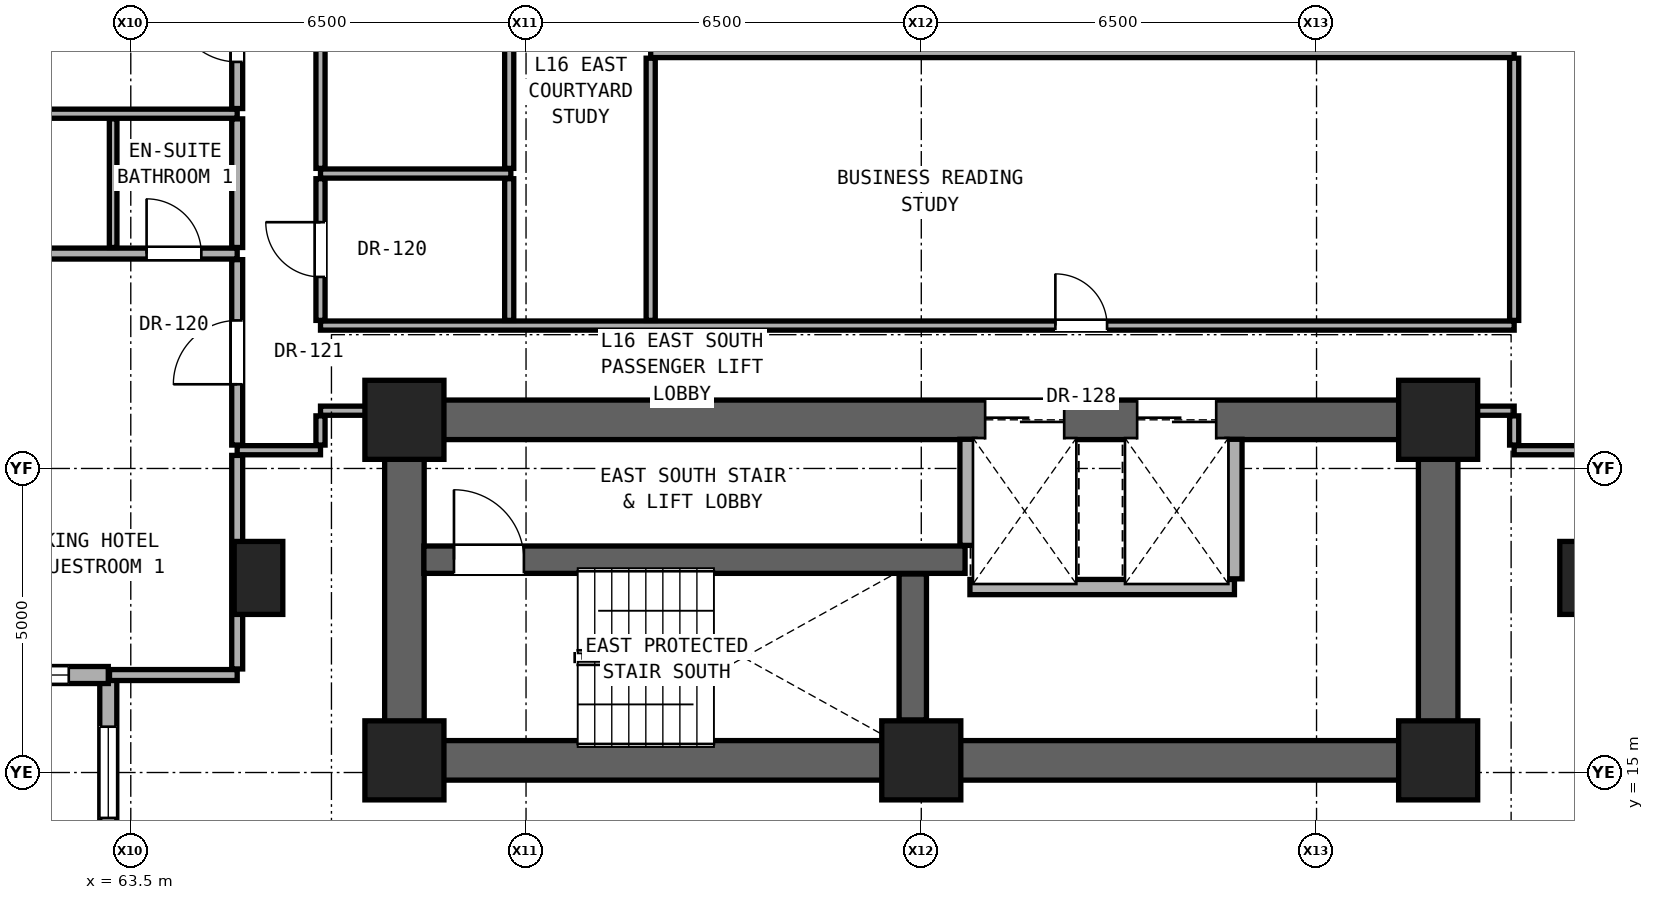
"""IFC4 building model, lengths in metres.
Left out: names, types, materials, properties, quantities, classifications, styles, units other than length and angle.
Written with IfcOpenShell. Run it as: python <this file> out.ifc"""

import sys

from ifc_helpers import new_model, si_unit, direction, frame, frame_2d, origin, origin_2d, place, context, subcontext, project, spatial, rectangle, extrude, element, fill, save


model = new_model("IFC4")
c1 = context("Model", 3, precision=1e-05, world=origin(), true_north=direction((0.0, 1.0)))
c2 = subcontext(c1, "Body", "Model", "MODEL_VIEW")
j1 = project(units=[si_unit("LENGTHUNIT", "METRE"), si_unit("PLANEANGLEUNIT", "RADIAN")], contexts=[c1])
p1 = place(None, origin())
s1 = spatial("IfcSite", under=j1, at=p1, CompositionType="ELEMENT")
p2 = place(p1, origin())
s2 = spatial("IfcBuilding", under=s1, at=p2, CompositionType="ELEMENT")
p3 = place(p2, frame((0.0, 0.0, 58.7)))
s3 = spatial("IfcBuildingStorey", under=s2, at=p3, CompositionType="ELEMENT", Elevation=58.7)
for number, where, z_axis, x_axis in (
    (1, (68.0, 15.2, 0.0), (0.0, 0.0, 1.0), (1.0, 0.0, 0.0)),
    (2, (76.5, 15.2, 0.0), (0.0, 0.0, 1.0), (1.0, 0.0, 0.0)),
    (3, (85.0, 15.2, 0.0), (0.0, 0.0, 1.0), (1.0, 0.0, 0.0)),
    (4, (68.0, 20.8, 0.0), (0.0, 0.0, 1.0), (1.0, 0.0, 0.0)),
    (5, (85.0, 20.8, 0.0), (0.0, 0.0, 1.0), (1.0, 0.0, 0.0)),
):
    element("IfcColumn", number, at=place(p3, frame(where, z_axis=z_axis, x_axis=x_axis)), inside=s3, PredefinedType="COLUMN", context=c2, shape_type="SweptSolid", body=[
        extrude(rectangle(XDim=1.3, YDim=1.3, at=origin_2d()), origin(), (0.0, 0.0, 1.0), 3.3),
    ])
for number, where, z_axis, x_axis in (
    (6, (65.6, 18.2, 0.0), (0.0, 0.0, 1.0), (1.0, 0.0, 0.0)),
    (7, (87.4, 18.2, 0.0), (0.0, 0.0, 1.0), (1.0, 0.0, 0.0)),
):
    element("IfcColumn", number, at=place(p3, frame(where, z_axis=z_axis, x_axis=x_axis)), inside=s3, PredefinedType="PILASTER", context=c2, shape_type="SweptSolid", body=[
        extrude(rectangle(XDim=0.8, YDim=1.2, at=origin_2d()), origin(), (0.0, 0.0, 1.0), 3.3),
    ])
p4 = place(p3, frame((68.0, 15.2, 0.0), z_axis=(0.0, 0.0, 1.0), x_axis=(1.0, 0.0, 0.0)))
e8 = element("IfcWall", 8, at=p4, inside=s3, PredefinedType="SHEAR", context=c2, shape_type="SweptSolid", body=[
    extrude(rectangle(XDim=17.0, YDim=0.65, at=frame_2d((8.5, 0.0))), origin(), (0.0, 0.0, 1.0), 3.06),
])
for number, where, z_axis, x_axis in (
    (9, (68.0, 15.2, 0.0), (0.0, 0.0, 1.0), (0.0, 1.0, 0.0)),
    (10, (85.0, 15.2, 0.0), (0.0, 0.0, 1.0), (0.0, 1.0, 0.0)),
):
    element("IfcWall", number, at=place(p3, frame(where, z_axis=z_axis, x_axis=x_axis)), inside=s3, PredefinedType="SHEAR", context=c2, shape_type="SweptSolid", body=[
        extrude(rectangle(XDim=5.6, YDim=0.65, at=frame_2d((2.8, 0.0))), origin(), (0.0, 0.0, 1.0), 3.06),
    ])
p5 = place(p3, frame((68.0, 20.8, 0.0), z_axis=(0.0, 0.0, 1.0), x_axis=(1.0, 0.0, 0.0)))
e11 = element("IfcWall", 11, at=p5, inside=s3, PredefinedType="SHEAR", context=c2, shape_type="SweptSolid", body=[
    extrude(rectangle(XDim=17.0, YDim=0.65, at=frame_2d((8.5, 0.0))), origin(), (0.0, 0.0, 1.0), 3.06),
])
p6 = place(p5, frame((9.55, 0.0, 0.0)))
e12 = element("IfcOpeningElement", 12, at=p6, cuts=e11, PredefinedType="OPENING", context=c2, shape_type="SweptSolid", body=[
    extrude(rectangle(XDim=1.3, YDim=2.3, at=frame_2d((0.65, 1.15))), frame((0.0, 0.335, 0.0), z_axis=(0.0, -1.0, 0.0), x_axis=(1.0, 0.0, 0.0)), (0.0, 0.0, 1.0), 0.67),
])
p7 = place(p5, frame((12.05, 0.0, 0.0)))
e13 = element("IfcOpeningElement", 13, at=p7, cuts=e11, PredefinedType="OPENING", context=c2, shape_type="SweptSolid", body=[
    extrude(rectangle(XDim=1.3, YDim=2.3, at=frame_2d((0.65, 1.15))), frame((0.0, 0.335, 0.0), z_axis=(0.0, -1.0, 0.0), x_axis=(1.0, 0.0, 0.0)), (0.0, 0.0, 1.0), 0.67),
])
p8 = place(p3, frame((63.13, 16.604, 0.0), z_axis=(0.0, 0.0, 1.0), x_axis=(0.0, -1.0, 0.0)))
e14 = element("IfcWall", 14, at=p8, inside=s3, PredefinedType="SOLIDWALL", context=c2, shape_type="SweptSolid", body=[
    extrude(rectangle(XDim=4.546, YDim=0.28, at=frame_2d((2.273, 0.0))), origin(), (0.0, 0.0, 1.0), 3.04),
])
p9 = place(p8, frame((0.85, 0.0, 0.79)))
e15 = element("IfcOpeningElement", 15, at=p9, cuts=e14, PredefinedType="OPENING", context=c2, shape_type="SweptSolid", body=[
    extrude(rectangle(XDim=1.5, YDim=2.1, at=frame_2d((0.75, 1.05))), frame((0.0, 0.15, 0.0), z_axis=(0.0, -1.0, 0.0), x_axis=(1.0, 0.0, 0.0)), (0.0, 0.0, 1.0), 0.3),
])
p10 = place(p3, frame((58.584, 16.604, 0.0), z_axis=(0.0, 0.0, 1.0), x_axis=(1.0, 0.0, 0.0)))
e16 = element("IfcWall", 16, at=p10, inside=s3, PredefinedType="SOLIDWALL", context=c2, shape_type="SweptSolid", body=[
    extrude(rectangle(XDim=4.546, YDim=0.28, at=frame_2d((2.273, 0.0))), origin(), (0.0, 0.0, 1.0), 3.04),
])
p11 = place(p10, frame((2.796, 0.0, 0.85)))
e17 = element("IfcOpeningElement", 17, at=p11, cuts=e16, PredefinedType="OPENING", context=c2, shape_type="SweptSolid", body=[
    extrude(rectangle(XDim=1.1, YDim=2.0, at=frame_2d((0.55, 1.0))), frame((0.0, 0.15, 0.0), z_axis=(0.0, -1.0, 0.0), x_axis=(1.0, 0.0, 0.0)), (0.0, 0.0, 1.0), 0.3),
])
p12 = place(p3, frame((63.15, 16.603, 0.0), z_axis=(0.0, 0.0, 1.0), x_axis=(1.0, 0.0, 0.0)))
e18 = element("IfcWall", 18, at=p12, inside=s3, PredefinedType="PARTITIONING", context=c2, shape_type="SweptSolid", body=[
    extrude(rectangle(XDim=2.1, YDim=0.18, at=frame_2d((1.05, 0.0))), origin(), (0.0, 0.0, 1.0), 3.06),
])
p13 = place(p3, frame((77.3, 18.05, 0.0), z_axis=(0.0, 0.0, 1.0), x_axis=(1.0, 0.0, 0.0)))
e19 = element("IfcWall", 19, at=p13, inside=s3, PredefinedType="SOLIDWALL", context=c2, shape_type="SweptSolid", body=[
    extrude(rectangle(XDim=4.35, YDim=0.25, at=frame_2d((2.175, 0.0))), origin(), (0.0, 0.0, 1.0), 3.06),
])
p14 = place(p3, frame((68.32, 18.5, 0.0), z_axis=(0.0, 0.0, 1.0), x_axis=(1.0, 0.0, 0.0)))
e20 = element("IfcWall", 20, at=p14, inside=s3, PredefinedType="SHEAR", context=c2, shape_type="SweptSolid", body=[
    extrude(rectangle(XDim=8.9, YDim=0.45, at=frame_2d((4.45, 0.0))), origin(), (0.0, 0.0, 1.0), 3.06),
])
p15 = place(p14, frame((0.495, 0.0, 0.0)))
e21 = element("IfcOpeningElement", 21, at=p15, cuts=e20, PredefinedType="OPENING", context=c2, shape_type="SweptSolid", body=[
    extrude(rectangle(XDim=1.15, YDim=2.2, at=frame_2d((0.575, 1.1))), frame((0.0, 0.235, 0.0), z_axis=(0.0, -1.0, 0.0), x_axis=(1.0, 0.0, 0.0)), (0.0, 0.0, 1.0), 0.47),
])
p16 = place(p3, frame((65.25, 20.3, 0.0), z_axis=(0.0, 0.0, 1.0), x_axis=(1.0, 0.0, 0.0)))
e22 = element("IfcWall", 22, at=p16, inside=s3, PredefinedType="PARTITIONING", context=c2, shape_type="SweptSolid", body=[
    extrude(rectangle(XDim=1.37, YDim=0.15, at=frame_2d((0.685, 0.0))), origin(), (0.0, 0.0, 1.0), 3.06),
])
p17 = place(p3, frame((86.25, 20.3, 0.0), z_axis=(0.0, 0.0, 1.0), x_axis=(1.0, 0.0, 0.0)))
e23 = element("IfcWall", 23, at=p17, inside=s3, PredefinedType="PARTITIONING", context=c2, shape_type="SweptSolid", body=[
    extrude(rectangle(XDim=1.35, YDim=0.15, at=frame_2d((0.675, 0.0))), origin(), (0.0, 0.0, 1.0), 3.06),
])
p18 = place(p3, frame((66.62, 20.95, 0.0), z_axis=(0.0, 0.0, 1.0), x_axis=(1.0, 0.0, 0.0)))
e24 = element("IfcWall", 24, at=p18, inside=s3, PredefinedType="PARTITIONING", context=c2, shape_type="SweptSolid", body=[
    extrude(rectangle(XDim=1.06, YDim=0.15, at=frame_2d((0.53, 0.0))), origin(), (0.0, 0.0, 1.0), 2.452),
])
p19 = place(p3, frame((85.32, 20.95, 0.0), z_axis=(0.0, 0.0, 1.0), x_axis=(1.0, 0.0, 0.0)))
e25 = element("IfcWall", 25, at=p19, inside=s3, PredefinedType="PARTITIONING", context=c2, shape_type="SweptSolid", body=[
    extrude(rectangle(XDim=0.93, YDim=0.15, at=frame_2d((0.465, 0.0))), origin(), (0.0, 0.0, 1.0), 2.452),
])
p20 = place(p3, frame((66.62, 22.35, 0.0), z_axis=(0.0, 0.0, 1.0), x_axis=(1.0, 0.0, 0.0)))
e26 = element("IfcWall", 26, at=p20, inside=s3, PredefinedType="PARTITIONING", context=c2, shape_type="SweptSolid", body=[
    extrude(rectangle(XDim=19.63, YDim=0.15, at=frame_2d((9.815, 0.0))), origin(), (0.0, 0.0, 1.0), 2.125),
])
p21 = place(p20, frame((12.085, 0.0, 0.0)))
e27 = element("IfcOpeningElement", 27, at=p21, cuts=e26, PredefinedType="OPENING", context=c2, shape_type="SweptSolid", body=[
    extrude(rectangle(XDim=0.85, YDim=2.01, at=frame_2d((0.425, 1.005))), frame((0.0, 0.085, 0.0), z_axis=(0.0, -1.0, 0.0), x_axis=(1.0, 0.0, 0.0)), (0.0, 0.0, 1.0), 0.17),
])
p22 = place(p3, frame((58.584, 23.534, 0.0), z_axis=(0.0, 0.0, 1.0), x_axis=(1.0, 0.0, 0.0)))
e28 = element("IfcWall", 28, at=p22, inside=s3, PredefinedType="PARTITIONING", context=c2, shape_type="SweptSolid", body=[
    extrude(rectangle(XDim=6.666, YDim=0.18, at=frame_2d((3.333, 0.0))), origin(), (0.0, 0.0, 1.0), 2.196),
])
p23 = place(p22, frame((1.858, 0.0, 0.0)))
e29 = element("IfcOpeningElement", 29, at=p23, cuts=e28, PredefinedType="OPENING", context=c2, shape_type="SweptSolid", body=[
    extrude(rectangle(XDim=0.95, YDim=2.15, at=frame_2d((0.475, 1.075))), frame((0.0, 0.1, 0.0), z_axis=(0.0, -1.0, 0.0), x_axis=(1.0, 0.0, 0.0)), (0.0, 0.0, 1.0), 0.2),
])
p24 = place(p22, frame((5.176, 0.0, 0.0)))
e30 = element("IfcOpeningElement", 30, at=p24, cuts=e28, PredefinedType="OPENING", context=c2, shape_type="SweptSolid", body=[
    extrude(rectangle(XDim=0.9, YDim=2.1, at=frame_2d((0.45, 1.05))), frame((0.0, 0.1, 0.0), z_axis=(0.0, -1.0, 0.0), x_axis=(1.0, 0.0, 0.0)), (0.0, 0.0, 1.0), 0.2),
])
p25 = place(p3, frame((66.62, 24.85, 0.0), z_axis=(0.0, 0.0, 1.0), x_axis=(1.0, 0.0, 0.0)))
e31 = element("IfcWall", 31, at=p25, inside=s3, PredefinedType="PARTITIONING", context=c2, shape_type="SweptSolid", body=[
    extrude(rectangle(XDim=3.13, YDim=0.15, at=frame_2d((1.565, 0.0))), origin(), (0.0, 0.0, 1.0), 2.125),
])
p26 = place(p3, frame((58.584, 25.834, 0.0), z_axis=(0.0, 0.0, 1.0), x_axis=(1.0, 0.0, 0.0)))
e32 = element("IfcWall", 32, at=p26, inside=s3, PredefinedType="PARTITIONING", context=c2, shape_type="SweptSolid", body=[
    extrude(rectangle(XDim=6.666, YDim=0.15, at=frame_2d((3.333, 0.0))), origin(), (0.0, 0.0, 1.0), 2.196),
])
p27 = place(p3, frame((72.05, 26.832, 0.0), z_axis=(0.0, 0.0, 1.0), x_axis=(1.0, 0.0, 0.0)))
e33 = element("IfcWall", 33, at=p27, inside=s3, PredefinedType="PARTITIONING", context=c2, shape_type="SweptSolid", body=[
    extrude(rectangle(XDim=14.2, YDim=0.15, at=frame_2d((7.1, 0.0))), origin(), (0.0, 0.0, 1.0), 2.125),
])
p28 = place(p3, frame((63.21, 23.634, 0.0), z_axis=(0.0, 0.0, 1.0), x_axis=(0.0, 1.0, 0.0)))
e34 = element("IfcWall", 34, at=p28, inside=s3, PredefinedType="PARTITIONING", context=c2, shape_type="SweptSolid", body=[
    extrude(rectangle(XDim=2.115, YDim=0.125, at=frame_2d((1.058, 0.0))), origin(), (0.0, 0.0, 1.0), 3.06),
])
p29 = place(p3, frame((65.25, 16.703, 0.0), z_axis=(0.0, 0.0, 1.0), x_axis=(0.0, 1.0, 0.0)))
e35 = element("IfcWall", 35, at=p29, inside=s3, PredefinedType="PARTITIONING", context=c2, shape_type="SweptSolid", body=[
    extrude(rectangle(XDim=3.512, YDim=0.18, at=frame_2d((1.756, 0.0))), origin(), (0.0, 0.0, 1.0), 2.436),
])
p30 = place(p3, frame((65.25, 20.385, 0.0), z_axis=(0.0, 0.0, 1.0), x_axis=(0.0, 1.0, 0.0)))
e36 = element("IfcWall", 36, at=p30, inside=s3, PredefinedType="PARTITIONING", context=c2, shape_type="SweptSolid", body=[
    extrude(rectangle(XDim=3.049, YDim=0.18, at=frame_2d((1.524, 0.0))), origin(), (0.0, 0.0, 1.0), 2.452),
])
p31 = place(p30, frame((1.0, 0.0, 0.0)))
e37 = element("IfcOpeningElement", 37, at=p31, cuts=e36, PredefinedType="OPENING", context=c2, shape_type="SweptSolid", body=[
    extrude(rectangle(XDim=1.05, YDim=2.2, at=frame_2d((0.525, 1.1))), frame((0.0, 0.1, 0.0), z_axis=(0.0, -1.0, 0.0), x_axis=(1.0, 0.0, 0.0)), (0.0, 0.0, 1.0), 0.2),
])
p32 = place(p3, frame((65.25, 23.634, 0.0), z_axis=(0.0, 0.0, 1.0), x_axis=(0.0, 1.0, 0.0)))
e38 = element("IfcWall", 38, at=p32, inside=s3, PredefinedType="PARTITIONING", context=c2, shape_type="SweptSolid", body=[
    extrude(rectangle(XDim=2.115, YDim=0.18, at=frame_2d((1.058, 0.0))), origin(), (0.0, 0.0, 1.0), 3.06),
])
p33 = place(p3, frame((65.25, 25.919, 0.0), z_axis=(0.0, 0.0, 1.0), x_axis=(0.0, 1.0, 0.0)))
e39 = element("IfcWall", 39, at=p33, inside=s3, PredefinedType="PARTITIONING", context=c2, shape_type="SweptSolid", body=[
    extrude(rectangle(XDim=2.584, YDim=0.18, at=frame_2d((1.292, 0.0))), origin(), (0.0, 0.0, 1.0), 2.279),
])
p34 = place(p33, frame((0.767, 0.0, 0.0)))
e40 = element("IfcOpeningElement", 40, at=p34, cuts=e39, PredefinedType="OPENING", context=c2, shape_type="SweptSolid", body=[
    extrude(rectangle(XDim=1.05, YDim=2.2, at=frame_2d((0.525, 1.1))), frame((0.0, 0.1, 0.0), z_axis=(0.0, -1.0, 0.0), x_axis=(1.0, 0.0, 0.0)), (0.0, 0.0, 1.0), 0.2),
])
p35 = place(p3, frame((66.62, 20.385, 0.0), z_axis=(0.0, 0.0, 1.0), x_axis=(0.0, 1.0, 0.0)))
e41 = element("IfcWall", 41, at=p35, inside=s3, PredefinedType="PARTITIONING", context=c2, shape_type="SweptSolid", body=[
    extrude(rectangle(XDim=0.48, YDim=0.15, at=frame_2d((0.24, 0.0))), origin(), (0.0, 0.0, 1.0), 2.452),
])
p36 = place(p3, frame((66.62, 22.435, 0.0), z_axis=(0.0, 0.0, 1.0), x_axis=(0.0, 1.0, 0.0)))
e42 = element("IfcWall", 42, at=p36, inside=s3, PredefinedType="PARTITIONING", context=c2, shape_type="SweptSolid", body=[
    extrude(rectangle(XDim=2.33, YDim=0.15, at=frame_2d((1.165, 0.0))), origin(), (0.0, 0.0, 1.0), 3.06),
])
p37 = place(p36, frame((0.715, 0.0, 0.0)))
e43 = element("IfcOpeningElement", 43, at=p37, cuts=e42, PredefinedType="OPENING", context=c2, shape_type="SweptSolid", body=[
    extrude(rectangle(XDim=0.9, YDim=2.1, at=frame_2d((0.45, 1.05))), frame((0.0, 0.085, 0.0), z_axis=(0.0, -1.0, 0.0), x_axis=(1.0, 0.0, 0.0)), (0.0, 0.0, 1.0), 0.17),
])
p38 = place(p3, frame((66.62, 24.935, 0.0), z_axis=(0.0, 0.0, 1.0), x_axis=(0.0, 1.0, 0.0)))
e44 = element("IfcWall", 44, at=p38, inside=s3, PredefinedType="PARTITIONING", context=c2, shape_type="SweptSolid", body=[
    extrude(rectangle(XDim=5.63, YDim=0.15, at=frame_2d((2.815, 0.0))), origin(), (0.0, 0.0, 1.0), 2.279),
])
p39 = place(p38, frame((2.34, 0.0, 0.0)))
e45 = element("IfcOpeningElement", 45, at=p39, cuts=e44, PredefinedType="OPENING", context=c2, shape_type="SweptSolid", body=[
    extrude(rectangle(XDim=0.95, YDim=2.15, at=frame_2d((0.475, 1.075))), frame((0.0, 0.085, 0.0), z_axis=(0.0, -1.0, 0.0), x_axis=(1.0, 0.0, 0.0)), (0.0, 0.0, 1.0), 0.17),
])
p40 = place(p3, frame((69.723, 22.435, 0.0), z_axis=(0.0, 0.0, 1.0), x_axis=(0.0, 1.0, 0.0)))
e46 = element("IfcWall", 46, at=p40, inside=s3, PredefinedType="PARTITIONING", context=c2, shape_type="SweptSolid", body=[
    extrude(rectangle(XDim=2.33, YDim=0.15, at=frame_2d((1.165, 0.0))), origin(), (0.0, 0.0, 1.0), 3.06),
])
p41 = place(p3, frame((69.723, 24.935, 0.0), z_axis=(0.0, 0.0, 1.0), x_axis=(0.0, 1.0, 0.0)))
e47 = element("IfcWall", 47, at=p41, inside=s3, PredefinedType="PARTITIONING", context=c2, shape_type="SweptSolid", body=[
    extrude(rectangle(XDim=5.63, YDim=0.15, at=frame_2d((2.815, 0.0))), origin(), (0.0, 0.0, 1.0), 2.125),
])
p42 = place(p3, frame((72.05, 22.435, 0.0), z_axis=(0.0, 0.0, 1.0), x_axis=(0.0, 1.0, 0.0)))
e48 = element("IfcWall", 48, at=p42, inside=s3, PredefinedType="PARTITIONING", context=c2, shape_type="SweptSolid", body=[
    extrude(rectangle(XDim=4.312, YDim=0.15, at=frame_2d((2.156, 0.0))), origin(), (0.0, 0.0, 1.0), 2.589),
])
p43 = place(p3, frame((76.36, 15.865, 0.0), z_axis=(0.0, 0.0, 1.0), x_axis=(0.0, 1.0, 0.0)))
e49 = element("IfcWall", 49, at=p43, inside=s3, PredefinedType="SHEAR", context=c2, shape_type="SweptSolid", body=[
    extrude(rectangle(XDim=2.4, YDim=0.45, at=frame_2d((1.2, 0.0))), origin(), (0.0, 0.0, 1.0), 3.06),
])
p44 = place(p3, frame((77.26, 18.735, 0.0), z_axis=(0.0, 0.0, 1.0), x_axis=(0.0, 1.0, 0.0)))
e50 = element("IfcWall", 50, at=p44, inside=s3, PredefinedType="SOLIDWALL", context=c2, shape_type="SweptSolid", body=[
    extrude(rectangle(XDim=1.745, YDim=0.25, at=frame_2d((0.873, 0.0))), origin(), (0.0, 0.0, 1.0), 3.06),
])
p45 = place(p3, frame((81.65, 18.185, 0.0), z_axis=(0.0, 0.0, 1.0), x_axis=(0.0, 1.0, 0.0)))
e51 = element("IfcWall", 51, at=p45, inside=s3, PredefinedType="SOLIDWALL", context=c2, shape_type="SweptSolid", body=[
    extrude(rectangle(XDim=2.295, YDim=0.25, at=frame_2d((1.147, 0.0))), origin(), (0.0, 0.0, 1.0), 3.06),
])
p46 = place(p3, frame((86.25, 20.385, 0.0), z_axis=(0.0, 0.0, 1.0), x_axis=(0.0, 1.0, 0.0)))
e52 = element("IfcWall", 52, at=p46, inside=s3, PredefinedType="PARTITIONING", context=c2, shape_type="SweptSolid", body=[
    extrude(rectangle(XDim=0.48, YDim=0.15, at=frame_2d((0.24, 0.0))), origin(), (0.0, 0.0, 1.0), 2.452),
])
p47 = place(p3, frame((86.25, 22.435, 0.0), z_axis=(0.0, 0.0, 1.0), x_axis=(0.0, 1.0, 0.0)))
e53 = element("IfcWall", 53, at=p47, inside=s3, PredefinedType="PARTITIONING", context=c2, shape_type="SweptSolid", body=[
    extrude(rectangle(XDim=4.312, YDim=0.15, at=frame_2d((2.156, 0.0))), origin(), (0.0, 0.0, 1.0), 3.06),
])
p48 = place(p9, origin())
e54 = element("IfcWindow", 54, at=p48, inside=s3, PartitioningType="SINGLE_PANEL", PredefinedType="WINDOW", context=c2, shape_type="SweptSolid", body=[
    extrude(rectangle(XDim=1.5, YDim=2.1, at=frame_2d((0.75, 1.05))), frame((0.0, 0.03, 0.0), z_axis=(0.0, -1.0, 0.0), x_axis=(1.0, 0.0, 0.0)), (0.0, 0.0, 1.0), 0.06),
])
fill(e15, e54)
p49 = place(p11, origin())
e55 = element("IfcWindow", 55, at=p49, inside=s3, PartitioningType="SINGLE_PANEL", PredefinedType="WINDOW", context=c2, shape_type="SweptSolid", body=[
    extrude(rectangle(XDim=1.1, YDim=2.0, at=frame_2d((0.55, 1.0))), frame((0.0, 0.03, 0.0), z_axis=(0.0, -1.0, 0.0), x_axis=(1.0, 0.0, 0.0)), (0.0, 0.0, 1.0), 0.06),
])
fill(e17, e55)
p50 = place(p15, origin())
e56 = element("IfcDoor", 56, at=p50, inside=s3, OperationType="SINGLE_SWING_LEFT", PredefinedType="DOOR", context=c2, shape_type="SweptSolid", body=[
    extrude(rectangle(XDim=1.15, YDim=2.2, at=frame_2d((0.575, 1.1))), frame((0.0, 0.025, 0.0), z_axis=(0.0, -1.0, 0.0), x_axis=(1.0, 0.0, 0.0)), (0.0, 0.0, 1.0), 0.05),
])
fill(e21, e56)
p51 = place(p37, origin())
e57 = element("IfcDoor", 57, at=p51, inside=s3, OperationType="SINGLE_SWING_RIGHT", PredefinedType="DOOR", context=c2, shape_type="SweptSolid", body=[
    extrude(rectangle(XDim=0.9, YDim=2.1, at=frame_2d((0.45, 1.05))), frame((0.0, 0.025, 0.0), z_axis=(0.0, -1.0, 0.0), x_axis=(1.0, 0.0, 0.0)), (0.0, 0.0, 1.0), 0.05),
])
fill(e43, e57)
p52 = place(p31, origin())
e58 = element("IfcDoor", 58, at=p52, inside=s3, OperationType="SINGLE_SWING_LEFT", PredefinedType="DOOR", context=c2, shape_type="SweptSolid", body=[
    extrude(rectangle(XDim=1.05, YDim=2.2, at=frame_2d((0.525, 1.1))), frame((0.0, 0.025, 0.0), z_axis=(0.0, -1.0, 0.0), x_axis=(1.0, 0.0, 0.0)), (0.0, 0.0, 1.0), 0.05),
])
fill(e37, e58)
p53 = place(p24, origin())
e59 = element("IfcDoor", 59, at=p53, inside=s3, OperationType="SINGLE_SWING_LEFT", PredefinedType="DOOR", context=c2, shape_type="SweptSolid", body=[
    extrude(rectangle(XDim=0.9, YDim=2.1, at=frame_2d((0.45, 1.05))), frame((0.0, 0.025, 0.0), z_axis=(0.0, -1.0, 0.0), x_axis=(1.0, 0.0, 0.0)), (0.0, 0.0, 1.0), 0.05),
])
fill(e30, e59)
p54 = place(p34, origin())
e60 = element("IfcDoor", 60, at=p54, inside=s3, OperationType="SINGLE_SWING_RIGHT", PredefinedType="DOOR", context=c2, shape_type="SweptSolid", body=[
    extrude(rectangle(XDim=1.05, YDim=2.2, at=frame_2d((0.525, 1.1))), frame((0.0, 0.025, 0.0), z_axis=(0.0, -1.0, 0.0), x_axis=(1.0, 0.0, 0.0)), (0.0, 0.0, 1.0), 0.05),
])
fill(e40, e60)
p55 = place(p21, origin())
e61 = element("IfcDoor", 61, at=p55, inside=s3, OperationType="SINGLE_SWING_LEFT", PredefinedType="DOOR", context=c2, shape_type="SweptSolid", body=[
    extrude(rectangle(XDim=0.85, YDim=2.01, at=frame_2d((0.425, 1.005))), frame((0.0, 0.025, 0.0), z_axis=(0.0, -1.0, 0.0), x_axis=(1.0, 0.0, 0.0)), (0.0, 0.0, 1.0), 0.05),
])
fill(e27, e61)
p56 = place(p6, origin())
e62 = element("IfcDoor", 62, at=p56, inside=s3, OperationType="DOUBLE_DOOR_SLIDING", PredefinedType="DOOR", context=c2, shape_type="SweptSolid", body=[
    extrude(rectangle(XDim=1.3, YDim=2.3, at=frame_2d((0.65, 1.15))), frame((0.0, 0.025, 0.0), z_axis=(0.0, -1.0, 0.0), x_axis=(1.0, 0.0, 0.0)), (0.0, 0.0, 1.0), 0.05),
])
fill(e12, e62)
p57 = place(p7, origin())
e63 = element("IfcDoor", 63, at=p57, inside=s3, OperationType="DOUBLE_DOOR_SLIDING", PredefinedType="DOOR", context=c2, shape_type="SweptSolid", body=[
    extrude(rectangle(XDim=1.3, YDim=2.3, at=frame_2d((0.65, 1.15))), frame((0.0, 0.025, 0.0), z_axis=(0.0, -1.0, 0.0), x_axis=(1.0, 0.0, 0.0)), (0.0, 0.0, 1.0), 0.05),
])
fill(e13, e63)
save(model, sys.argv[1])
